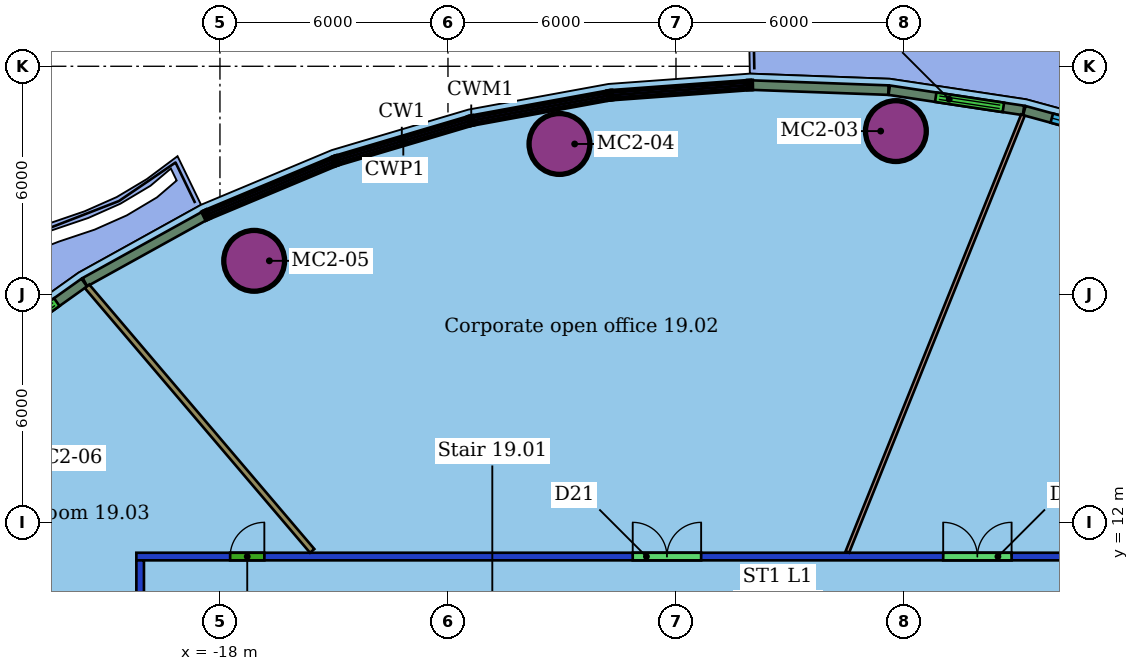
"""IFC4 building model, lengths in metres.
Left out: names, types, materials, properties, quantities, classifications, styles, units other than length and angle.
Written with IfcOpenShell. Run it as: python <this file> out.ifc"""

import sys

from ifc_helpers import new_model, si_unit, direction, frame, frame_2d, origin, origin_2d, place, context, subcontext, project, spatial, rectangle, hollow_circle, extrude, element, fill, save


model = new_model("IFC4")
c1 = context("Model", 3, precision=1e-05, world=origin(), true_north=direction((0.0, 1.0)))
c2 = subcontext(c1, "Body", "Model", "MODEL_VIEW")
j1 = project(units=[si_unit("LENGTHUNIT", "METRE"), si_unit("PLANEANGLEUNIT", "RADIAN")], contexts=[c1])
p1 = place(None, origin())
s1 = spatial("IfcSite", under=j1, at=p1, CompositionType="ELEMENT")
p2 = place(p1, origin())
s2 = spatial("IfcBuilding", under=s1, at=p2, CompositionType="ELEMENT")
p3 = place(p2, frame((0.0, 0.0, 88.6)))
s3 = spatial("IfcBuildingStorey", under=s2, at=p3, CompositionType="ELEMENT", Elevation=88.6)
for number, where, z_axis, x_axis in (
    (1, (-0.213, 22.294, 0.0), (0.0, 0.0, 1.0), (1.0, 0.0, 0.0)),
    (2, (-9.066, 21.956, 0.0), (0.0, 0.0, 1.0), (1.0, 0.0, 0.0)),
    (3, (-17.1, 18.881, 0.0), (0.0, 0.0, 1.0), (1.0, 0.0, 0.0)),
):
    element("IfcColumn", number, at=place(p3, frame(where, z_axis=z_axis, x_axis=x_axis)), inside=s3, PredefinedType="COLUMN", context=c2, shape_type="SweptSolid", body=[
        extrude(hollow_circle(Radius=0.8, WallThickness=0.055, at=origin_2d()), origin(), (0.0, 0.0, 1.0), 3.45),
    ])
p4 = place(p3, frame((-20.1, -11.0, 0.0), z_axis=(0.0, 0.0, 1.0), x_axis=(0.0, 1.0, 0.0)))
e4 = element("IfcWall", 4, at=p4, inside=s3, PredefinedType="PARTITIONING", context=c2, shape_type="SweptSolid", body=[
    extrude(rectangle(XDim=22.0, YDim=0.2, at=frame_2d((11.0, 0.0))), origin(), (0.0, 0.0, 1.0), 3.0),
])
p5 = place(p4, frame((14.9, 0.0, 0.0)))
e5 = element("IfcOpeningElement", 5, at=p5, cuts=e4, PredefinedType="OPENING", context=c2, shape_type="SweptSolid", body=[
    extrude(rectangle(XDim=0.9, YDim=2.1, at=frame_2d((0.45, 1.05))), frame((0.0, 0.11, 0.0), z_axis=(0.0, -1.0, 0.0), x_axis=(1.0, 0.0, 0.0)), (0.0, 0.0, 1.0), 0.22),
])
p6 = place(p4, frame((8.17, 0.0, 0.0)))
e6 = element("IfcOpeningElement", 6, at=p6, cuts=e4, PredefinedType="OPENING", context=c2, shape_type="SweptSolid", body=[
    extrude(rectangle(XDim=1.8, YDim=2.4, at=frame_2d((0.9, 1.2))), frame((0.0, 0.11, 0.0), z_axis=(0.0, -1.0, 0.0), x_axis=(1.0, 0.0, 0.0)), (0.0, 0.0, 1.0), 0.22),
])
p7 = place(p4, frame((3.835, 0.0, 0.0)))
e7 = element("IfcOpeningElement", 7, at=p7, cuts=e4, PredefinedType="OPENING", context=c2, shape_type="SweptSolid", body=[
    extrude(rectangle(XDim=1.8, YDim=2.1, at=frame_2d((0.9, 1.05))), frame((0.0, 0.11, 0.0), z_axis=(0.0, -1.0, 0.0), x_axis=(1.0, 0.0, 0.0)), (0.0, 0.0, 1.0), 0.22),
])
p8 = place(p3, frame((-20.2, 11.1, 0.0), z_axis=(0.0, 0.0, 1.0), x_axis=(1.0, 0.0, 0.0)))
e8 = element("IfcWall", 8, at=p8, inside=s3, PredefinedType="PARTITIONING", context=c2, shape_type="SweptSolid", body=[
    extrude(rectangle(XDim=28.4, YDim=0.2, at=frame_2d((14.2, 0.0))), origin(), (0.0, 0.0, 1.0), 3.0),
])
p9 = place(p8, frame((21.231, 0.0, 0.0)))
e9 = element("IfcOpeningElement", 9, at=p9, cuts=e8, PredefinedType="OPENING", context=c2, shape_type="SweptSolid", body=[
    extrude(rectangle(XDim=1.8, YDim=2.1, at=frame_2d((0.9, 1.05))), frame((0.0, 0.11, 0.0), z_axis=(0.0, -1.0, 0.0), x_axis=(1.0, 0.0, 0.0)), (0.0, 0.0, 1.0), 0.22),
])
p10 = place(p8, frame((13.062, 0.0, 0.0)))
e10 = element("IfcOpeningElement", 10, at=p10, cuts=e8, PredefinedType="OPENING", context=c2, shape_type="SweptSolid", body=[
    extrude(rectangle(XDim=1.8, YDim=2.1, at=frame_2d((0.9, 1.05))), frame((0.0, 0.11, 0.0), z_axis=(0.0, -1.0, 0.0), x_axis=(1.0, 0.0, 0.0)), (0.0, 0.0, 1.0), 0.22),
])
p11 = place(p8, frame((2.468, 0.0, 0.0)))
e11 = element("IfcOpeningElement", 11, at=p11, cuts=e8, PredefinedType="OPENING", context=c2, shape_type="SweptSolid", body=[
    extrude(rectangle(XDim=0.9, YDim=2.1, at=frame_2d((0.45, 1.05))), frame((0.0, 0.11, 0.0), z_axis=(0.0, -1.0, 0.0), x_axis=(1.0, 0.0, 0.0)), (0.0, 0.0, 1.0), 0.22),
])
p12 = place(p3, frame((3.13, 22.715, 0.0), z_axis=(0.0, 0.0, 1.0), x_axis=(-0.372949536222, -0.927851627919, 0.0)))
e12 = element("IfcWall", 12, at=p12, inside=s3, PredefinedType="PARTITIONING", context=c2, shape_type="SweptSolid", body=[
    extrude(rectangle(XDim=12.39, YDim=0.1, at=frame_2d((6.195, 0.0))), origin(), (0.0, 0.0, 1.0), 3.45),
])
p13 = place(p3, frame((-21.496, 18.209, 0.0), z_axis=(0.0, 0.0, 1.0), x_axis=(0.648105775004, -0.761550329529, 0.0)))
e13 = element("IfcWall", 13, at=p13, inside=s3, PredefinedType="PARTITIONING", context=c2, shape_type="SweptSolid", body=[
    extrude(rectangle(XDim=9.14, YDim=0.15, at=frame_2d((4.57, 0.0))), origin(), (0.0, 0.0, 1.0), 3.45),
])
p14 = place(p3, frame((-29.251, 11.193, 0.0), z_axis=(0.0, 0.0, 1.0), x_axis=(0.901024974185, -0.433767213946, 0.0)))
e14 = element("IfcWall", 14, at=p14, inside=s3, PredefinedType="PARTITIONING", context=c2, shape_type="SweptSolid", body=[
    extrude(rectangle(XDim=10.009, YDim=0.15, at=frame_2d((5.004, 0.0))), origin(), (0.0, 0.0, 1.0), 3.45),
])
p15 = place(p3, frame((6.541, 21.913, 0.0), z_axis=(0.0, 0.0, 1.0), x_axis=(-0.964717093179, 0.263288682112, 0.0)))
e15 = element("IfcWall", 15, at=p15, inside=s3, PredefinedType="SOLIDWALL", context=c2, shape_type="SweptSolid", body=[
    extrude(rectangle(XDim=3.498, YDim=0.25, at=frame_2d((1.749, 0.0))), origin(), (0.0, 0.0, 1.0), 3.05),
])
p16 = place(p15, frame((0.749, 0.0, 0.9)))
e16 = element("IfcOpeningElement", 16, at=p16, cuts=e15, PredefinedType="OPENING", context=c2, shape_type="SweptSolid", body=[
    extrude(rectangle(XDim=2.0, YDim=2.1, at=frame_2d((1.0, 1.05))), frame((0.0, 0.135, 0.0), z_axis=(0.0, -1.0, 0.0), x_axis=(1.0, 0.0, 0.0)), (0.0, 0.0, 1.0), 0.27),
])
p17 = place(p3, frame((3.145, 22.839, 0.0), z_axis=(0.0, 0.0, 1.0), x_axis=(-0.988850976046, 0.148908519475, 0.0)))
e17 = element("IfcWall", 17, at=p17, inside=s3, PredefinedType="SOLIDWALL", context=c2, shape_type="SweptSolid", body=[
    extrude(rectangle(XDim=3.573, YDim=0.25, at=frame_2d((1.786, 0.0))), origin(), (0.0, 0.0, 1.0), 3.05),
])
p18 = place(p17, frame((0.536, 0.0, 0.0)))
e18 = element("IfcOpeningElement", 18, at=p18, cuts=e17, PredefinedType="OPENING", context=c2, shape_type="SweptSolid", body=[
    extrude(rectangle(XDim=1.8, YDim=2.4, at=frame_2d((0.9, 1.2))), frame((0.0, 0.135, 0.0), z_axis=(0.0, -1.0, 0.0), x_axis=(1.0, 0.0, 0.0)), (0.0, 0.0, 1.0), 0.27),
])
p19 = place(p3, frame((-0.41, 23.373, 0.0), z_axis=(0.0, 0.0, 1.0), x_axis=(-0.999324862533, 0.036739884652, 0.0)))
e19 = element("IfcWall", 19, at=p19, inside=s3, PredefinedType="SOLIDWALL", context=c2, shape_type="SweptSolid", body=[
    extrude(rectangle(XDim=3.588, YDim=0.25, at=frame_2d((1.794, 0.0))), origin(), (0.0, 0.0, 1.0), 3.05),
])
p20 = place(p3, frame((-18.415, 20.059, 0.0), z_axis=(0.0, 0.0, 1.0), x_axis=(-0.874740773149, -0.484591147042, 0.0)))
e20 = element("IfcWall", 20, at=p20, inside=s3, PredefinedType="SOLIDWALL", context=c2, shape_type="SweptSolid", body=[
    extrude(rectangle(XDim=3.588, YDim=0.25, at=frame_2d((1.794, 0.0))), origin(), (0.0, 0.0, 1.0), 3.05),
])
p21 = place(p3, frame((-21.572, 18.308, 0.0), z_axis=(0.0, 0.0, 1.0), x_axis=(-0.814702052805, -0.579879785089, 0.0)))
e21 = element("IfcWall", 21, at=p21, inside=s3, PredefinedType="SOLIDWALL", context=c2, shape_type="SweptSolid", body=[
    extrude(rectangle(XDim=3.572, YDim=0.25, at=frame_2d((1.786, 0.0))), origin(), (0.0, 0.0, 1.0), 3.05),
])
p22 = place(p21, frame((0.886, 0.0, 0.0)))
e22 = element("IfcOpeningElement", 22, at=p22, cuts=e21, PredefinedType="OPENING", context=c2, shape_type="SweptSolid", body=[
    extrude(rectangle(XDim=1.8, YDim=2.4, at=frame_2d((0.9, 1.2))), frame((0.0, 0.135, 0.0), z_axis=(0.0, -1.0, 0.0), x_axis=(1.0, 0.0, 0.0)), (0.0, 0.0, 1.0), 0.27),
])
p23 = place(p9, origin())
e23 = element("IfcDoor", 23, at=p23, inside=s3, OperationType="DOUBLE_DOOR_SINGLE_SWING", PredefinedType="DOOR", context=c2, shape_type="SweptSolid", body=[
    extrude(rectangle(XDim=1.8, YDim=2.1, at=frame_2d((0.9, 1.05))), frame((0.0, 0.025, 0.0), z_axis=(0.0, -1.0, 0.0), x_axis=(1.0, 0.0, 0.0)), (0.0, 0.0, 1.0), 0.05),
])
fill(e9, e23)
p24 = place(p10, origin())
e24 = element("IfcDoor", 24, at=p24, inside=s3, OperationType="DOUBLE_DOOR_SINGLE_SWING", PredefinedType="DOOR", context=c2, shape_type="SweptSolid", body=[
    extrude(rectangle(XDim=1.8, YDim=2.1, at=frame_2d((0.9, 1.05))), frame((0.0, 0.025, 0.0), z_axis=(0.0, -1.0, 0.0), x_axis=(1.0, 0.0, 0.0)), (0.0, 0.0, 1.0), 0.05),
])
fill(e10, e24)
p25 = place(p11, origin())
e25 = element("IfcDoor", 25, at=p25, inside=s3, OperationType="SINGLE_SWING_RIGHT", PredefinedType="DOOR", context=c2, shape_type="SweptSolid", body=[
    extrude(rectangle(XDim=0.9, YDim=2.1, at=frame_2d((0.45, 1.05))), frame((0.0, 0.025, 0.0), z_axis=(0.0, -1.0, 0.0), x_axis=(1.0, 0.0, 0.0)), (0.0, 0.0, 1.0), 0.05),
])
fill(e11, e25)
p26 = place(p16, origin())
e26 = element("IfcWindow", 26, at=p26, inside=s3, PartitioningType="SINGLE_PANEL", PredefinedType="WINDOW", context=c2, shape_type="SweptSolid", body=[
    extrude(rectangle(XDim=2.0, YDim=2.1, at=frame_2d((1.0, 1.05))), frame((0.0, 0.03, 0.0), z_axis=(0.0, -1.0, 0.0), x_axis=(1.0, 0.0, 0.0)), (0.0, 0.0, 1.0), 0.06),
])
fill(e16, e26)
p27 = place(p18, origin())
e27 = element("IfcDoor", 27, at=p27, inside=s3, OperationType="DOUBLE_DOOR_SLIDING", PredefinedType="DOOR", context=c2, shape_type="SweptSolid", body=[
    extrude(rectangle(XDim=1.8, YDim=2.4, at=frame_2d((0.9, 1.2))), frame((0.0, 0.025, 0.0), z_axis=(0.0, -1.0, 0.0), x_axis=(1.0, 0.0, 0.0)), (0.0, 0.0, 1.0), 0.05),
])
fill(e18, e27)
p28 = place(p22, origin())
e28 = element("IfcDoor", 28, at=p28, inside=s3, OperationType="DOUBLE_DOOR_SLIDING", PredefinedType="DOOR", context=c2, shape_type="SweptSolid", body=[
    extrude(rectangle(XDim=1.8, YDim=2.4, at=frame_2d((0.9, 1.2))), frame((0.0, 0.025, 0.0), z_axis=(0.0, -1.0, 0.0), x_axis=(1.0, 0.0, 0.0)), (0.0, 0.0, 1.0), 0.05),
])
fill(e22, e28)
save(model, sys.argv[1])
